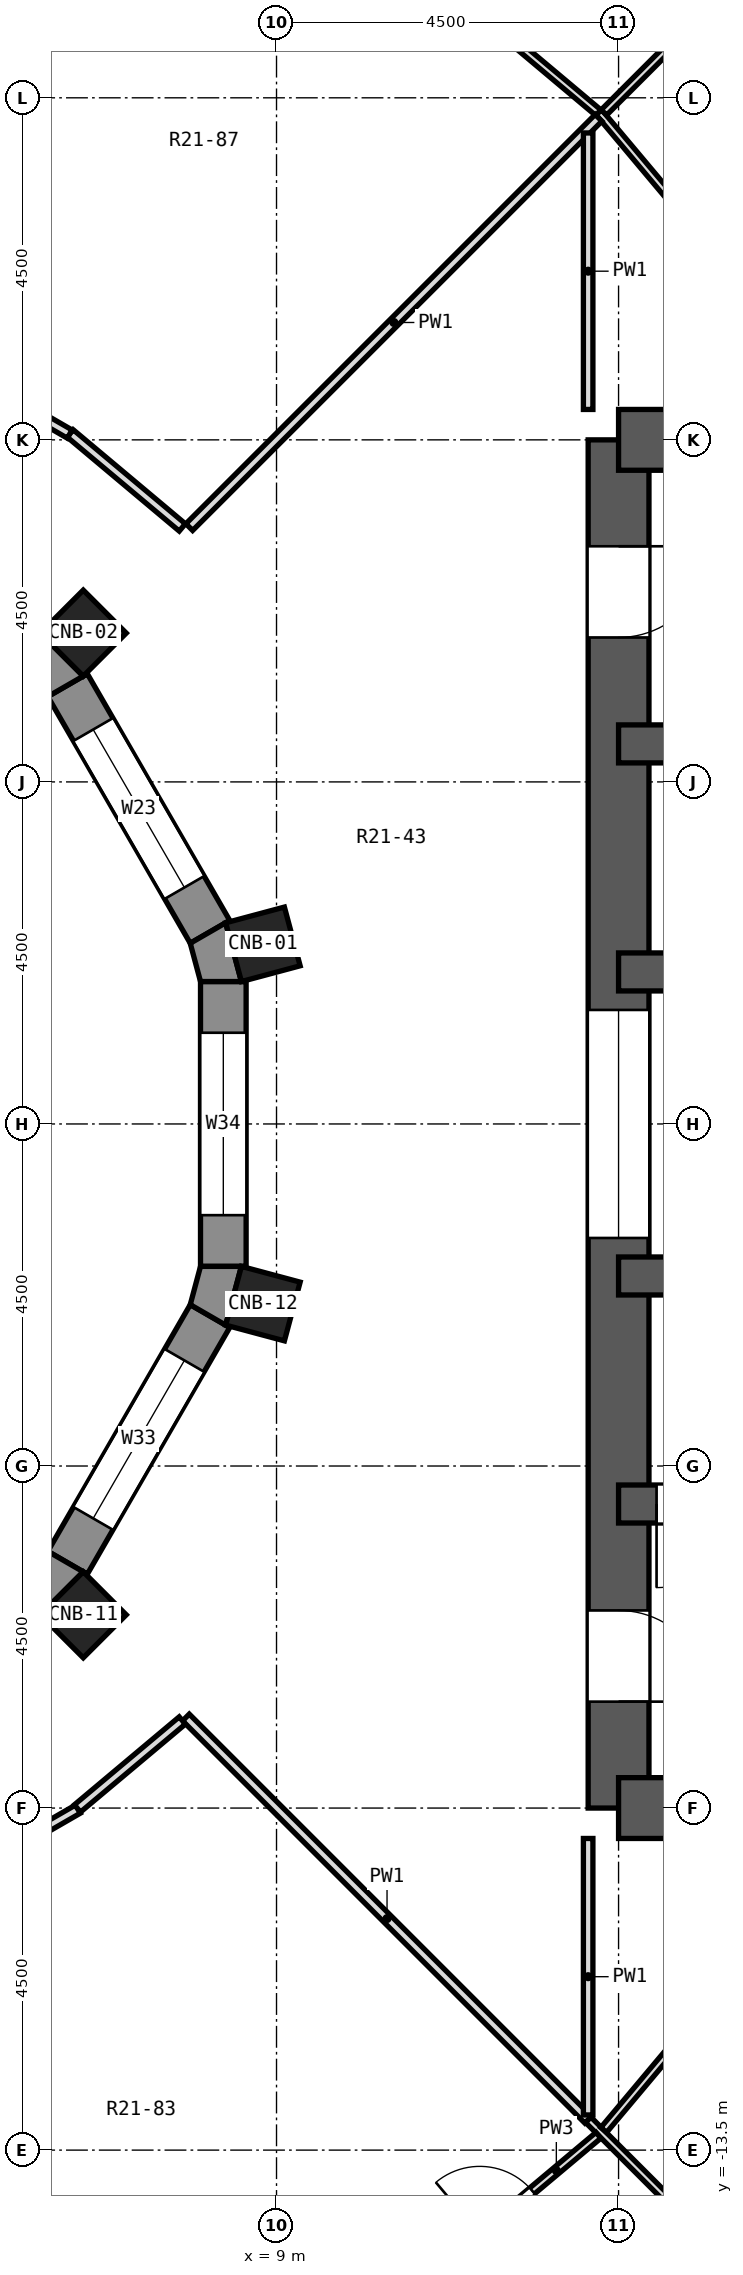
"""IFC4 building model, lengths in metres.
Left out: names, types, materials, properties, quantities, classifications, styles, units other than length and angle.
Written with IfcOpenShell. Run it as: python <this file> out.ifc"""

import sys

from ifc_helpers import new_model, si_unit, direction, frame, frame_2d, origin, origin_2d, place, context, subcontext, project, spatial, polyline, rectangle, outline, extrude, element, fill, save


model = new_model("IFC4")
c1 = context("Model", 3, precision=1e-05, world=origin(), true_north=direction((0.0, 1.0)))
c2 = subcontext(c1, "Body", "Model", "MODEL_VIEW")
j1 = project(units=[si_unit("LENGTHUNIT", "METRE"), si_unit("PLANEANGLEUNIT", "RADIAN")], contexts=[c1])
p1 = place(None, origin())
s1 = spatial("IfcSite", under=j1, at=p1, CompositionType="ELEMENT")
p2 = place(p1, origin())
s2 = spatial("IfcBuilding", under=s1, at=p2, CompositionType="ELEMENT")
p3 = place(p2, frame((0.0, 0.0, 131.5)))
s3 = spatial("IfcBuildingStorey", under=s2, at=p3, CompositionType="ELEMENT", Elevation=131.5)
for number, where, z_axis, x_axis in (
    (1, (8.821, 2.364, 0.0), (0.0, 0.0, 1.0), (0.966, 0.259, 0.0)),
    (2, (6.458, 6.458, 0.0), (0.0, 0.0, 1.0), (0.707, 0.707, 0.0)),
    (3, (6.458, -6.458, 0.0), (0.0, 0.0, 1.0), (0.707, -0.707, 0.0)),
    (4, (8.821, -2.364, 0.0), (0.0, 0.0, 1.0), (0.966, -0.259, 0.0)),
):
    element("IfcColumn", number, at=place(p3, frame(where, z_axis=z_axis, x_axis=x_axis)), inside=s3, PredefinedType="COLUMN", context=c2, shape_type="SweptSolid", body=[
        extrude(rectangle(XDim=0.8, YDim=0.8, at=origin_2d()), origin(), (0.0, 0.0, 1.0), 3.3),
    ])
p4 = place(p3, frame((13.5, -9.0, 0.0), z_axis=(0.0, 0.0, 1.0), x_axis=(0.0, 1.0, 0.0)))
e5 = element("IfcWall", 5, at=p4, inside=s3, PredefinedType="SHEAR", context=c2, shape_type="SweptSolid", body=[
    extrude(rectangle(XDim=18.0, YDim=0.8, at=frame_2d((9.0, 0.0))), origin(), (0.0, 0.0, 1.0), 3.3),
])
p5 = place(p4, frame((15.4, 0.0, 0.0)))
e6 = element("IfcOpeningElement", 6, at=p5, cuts=e5, PredefinedType="OPENING", context=c2, shape_type="SweptSolid", body=[
    extrude(rectangle(XDim=1.2, YDim=2.1, at=frame_2d((0.6, 1.05))), frame((0.0, 0.412, 0.0), z_axis=(0.0, -1.0, 0.0), x_axis=(1.0, 0.0, 0.0)), (0.0, 0.0, 1.0), 0.824),
])
p6 = place(p4, frame((1.4, 0.0, 0.0)))
e7 = element("IfcOpeningElement", 7, at=p6, cuts=e5, PredefinedType="OPENING", context=c2, shape_type="SweptSolid", body=[
    extrude(rectangle(XDim=1.2, YDim=2.1, at=frame_2d((0.6, 1.05))), frame((0.0, 0.412, 0.0), z_axis=(0.0, -1.0, 0.0), x_axis=(1.0, 0.0, 0.0)), (0.0, 0.0, 1.0), 0.824),
])
p7 = place(p4, frame((7.5, 0.0, 0.0)))
e8 = element("IfcOpeningElement", 8, at=p7, cuts=e5, PredefinedType="OPENING", context=c2, shape_type="SweptSolid", body=[
    extrude(rectangle(XDim=3.0, YDim=2.4, at=frame_2d((1.5, 1.2))), frame((0.0, 0.412, 0.0), z_axis=(0.0, -1.0, 0.0), x_axis=(1.0, 0.0, 0.0)), (0.0, 0.0, 1.0), 0.824),
])
for number, where, z_axis, x_axis in (
    (9, (13.5, 9.0, 0.0), (0.0, 0.0, 1.0), (1.0, 0.0, 0.0)),
    (10, (13.5, -9.0, 0.0), (0.0, 0.0, 1.0), (1.0, 0.0, 0.0)),
):
    element("IfcWall", number, at=place(p3, frame(where, z_axis=z_axis, x_axis=x_axis)), inside=s3, PredefinedType="SHEAR", context=c2, shape_type="SweptSolid", body=[
        extrude(rectangle(XDim=10.4, YDim=0.8, at=frame_2d((5.2, 0.0))), origin(), (0.0, 0.0, 1.0), 3.3),
    ])
p8 = place(p3, frame((13.5, 5.0, 0.0), z_axis=(0.0, 0.0, 1.0), x_axis=(1.0, 0.0, 0.0)))
e11 = element("IfcWall", 11, at=p8, inside=s3, PredefinedType="SHEAR", context=c2, shape_type="SweptSolid", body=[
    extrude(rectangle(XDim=10.4, YDim=0.5, at=frame_2d((5.2, 0.0))), origin(), (0.0, 0.0, 1.0), 3.3),
])
p9 = place(p8, frame((8.686, 0.0, 0.0)))
e12 = element("IfcOpeningElement", 12, at=p9, cuts=e11, PredefinedType="OPENING", context=c2, shape_type="SweptSolid", body=[
    extrude(rectangle(XDim=0.9, YDim=2.1, at=frame_2d((0.45, 1.05))), frame((0.0, 0.262, 0.0), z_axis=(0.0, -1.0, 0.0), x_axis=(1.0, 0.0, 0.0)), (0.0, 0.0, 1.0), 0.524),
])
p10 = place(p3, frame((13.5, -5.0, 0.0), z_axis=(0.0, 0.0, 1.0), x_axis=(1.0, 0.0, 0.0)))
e13 = element("IfcWall", 13, at=p10, inside=s3, PredefinedType="SHEAR", context=c2, shape_type="SweptSolid", body=[
    extrude(rectangle(XDim=10.4, YDim=0.5, at=frame_2d((5.2, 0.0))), origin(), (0.0, 0.0, 1.0), 3.3),
])
p11 = place(p10, frame((6.639, 0.0, 0.0)))
e14 = element("IfcOpeningElement", 14, at=p11, cuts=e13, PredefinedType="OPENING", context=c2, shape_type="SweptSolid", body=[
    extrude(rectangle(XDim=0.9, YDim=2.1, at=frame_2d((0.45, 1.05))), frame((0.0, 0.262, 0.0), z_axis=(0.0, -1.0, 0.0), x_axis=(1.0, 0.0, 0.0)), (0.0, 0.0, 1.0), 0.524),
])
p12 = place(p10, frame((8.756, 0.0, 0.0)))
e15 = element("IfcOpeningElement", 15, at=p12, cuts=e13, PredefinedType="OPENING", context=c2, shape_type="SweptSolid", body=[
    extrude(rectangle(XDim=0.9, YDim=2.1, at=frame_2d((0.45, 1.05))), frame((0.0, 0.262, 0.0), z_axis=(0.0, -1.0, 0.0), x_axis=(1.0, 0.0, 0.0)), (0.0, 0.0, 1.0), 0.524),
])
p13 = place(p10, frame((0.5, 0.0, 0.0)))
e16 = element("IfcOpeningElement", 16, at=p13, cuts=e13, PredefinedType="OPENING", context=c2, shape_type="SweptSolid", body=[
    extrude(rectangle(XDim=1.1, YDim=2.1, at=frame_2d((0.55, 1.05))), frame((0.0, 0.262, 0.0), z_axis=(0.0, -1.0, 0.0), x_axis=(1.0, 0.0, 0.0)), (0.0, 0.0, 1.0), 0.524),
])
p14 = place(p3, frame((13.5, 2.0, 0.0), z_axis=(0.0, 0.0, 1.0), x_axis=(1.0, 0.0, 0.0)))
e17 = element("IfcWall", 17, at=p14, inside=s3, PredefinedType="SHEAR", context=c2, shape_type="SweptSolid", body=[
    extrude(rectangle(XDim=10.4, YDim=0.5, at=frame_2d((5.2, 0.0))), origin(), (0.0, 0.0, 1.0), 3.3),
])
p15 = place(p14, frame((5.37, 0.0, 0.0)))
e18 = element("IfcOpeningElement", 18, at=p15, cuts=e17, PredefinedType="OPENING", context=c2, shape_type="SweptSolid", body=[
    extrude(rectangle(XDim=1.1, YDim=2.1, at=frame_2d((0.55, 1.05))), frame((0.0, 0.262, 0.0), z_axis=(0.0, -1.0, 0.0), x_axis=(1.0, 0.0, 0.0)), (0.0, 0.0, 1.0), 0.524),
])
p16 = place(p14, frame((1.511, 0.0, 0.0)))
e19 = element("IfcOpeningElement", 19, at=p16, cuts=e17, PredefinedType="OPENING", context=c2, shape_type="SweptSolid", body=[
    extrude(rectangle(XDim=0.9, YDim=2.1, at=frame_2d((0.45, 1.05))), frame((0.0, 0.262, 0.0), z_axis=(0.0, -1.0, 0.0), x_axis=(1.0, 0.0, 0.0)), (0.0, 0.0, 1.0), 0.524),
])
p17 = place(p14, frame((3.841, 0.0, 0.0)))
e20 = element("IfcOpeningElement", 20, at=p17, cuts=e17, PredefinedType="OPENING", context=c2, shape_type="SweptSolid", body=[
    extrude(rectangle(XDim=0.9, YDim=2.1, at=frame_2d((0.45, 1.05))), frame((0.0, 0.262, 0.0), z_axis=(0.0, -1.0, 0.0), x_axis=(1.0, 0.0, 0.0)), (0.0, 0.0, 1.0), 0.524),
])
p18 = place(p14, frame((7.355, 0.0, 0.0)))
e21 = element("IfcOpeningElement", 21, at=p18, cuts=e17, PredefinedType="OPENING", context=c2, shape_type="SweptSolid", body=[
    extrude(rectangle(XDim=0.9, YDim=2.1, at=frame_2d((0.45, 1.05))), frame((0.0, 0.262, 0.0), z_axis=(0.0, -1.0, 0.0), x_axis=(1.0, 0.0, 0.0)), (0.0, 0.0, 1.0), 0.524),
])
p19 = place(p14, frame((8.686, 0.0, 0.0)))
e22 = element("IfcOpeningElement", 22, at=p19, cuts=e17, PredefinedType="OPENING", context=c2, shape_type="SweptSolid", body=[
    extrude(rectangle(XDim=0.9, YDim=2.1, at=frame_2d((0.45, 1.05))), frame((0.0, 0.262, 0.0), z_axis=(0.0, -1.0, 0.0), x_axis=(1.0, 0.0, 0.0)), (0.0, 0.0, 1.0), 0.524),
])
p20 = place(p3, frame((13.5, -2.0, 0.0), z_axis=(0.0, 0.0, 1.0), x_axis=(1.0, 0.0, 0.0)))
e23 = element("IfcWall", 23, at=p20, inside=s3, PredefinedType="SHEAR", context=c2, shape_type="SweptSolid", body=[
    extrude(rectangle(XDim=10.4, YDim=0.5, at=frame_2d((5.2, 0.0))), origin(), (0.0, 0.0, 1.0), 3.3),
])
p21 = place(p20, frame((1.215, 0.0, 0.0)))
e24 = element("IfcOpeningElement", 24, at=p21, cuts=e23, PredefinedType="OPENING", context=c2, shape_type="SweptSolid", body=[
    extrude(rectangle(XDim=1.0, YDim=2.1, at=frame_2d((0.5, 1.05))), frame((0.0, 0.262, 0.0), z_axis=(0.0, -1.0, 0.0), x_axis=(1.0, 0.0, 0.0)), (0.0, 0.0, 1.0), 0.524),
])
p22 = place(p20, frame((6.384, 0.0, 0.0)))
e25 = element("IfcOpeningElement", 25, at=p22, cuts=e23, PredefinedType="OPENING", context=c2, shape_type="SweptSolid", body=[
    extrude(rectangle(XDim=0.9, YDim=2.1, at=frame_2d((0.45, 1.05))), frame((0.0, 0.262, 0.0), z_axis=(0.0, -1.0, 0.0), x_axis=(1.0, 0.0, 0.0)), (0.0, 0.0, 1.0), 0.524),
])
p23 = place(p20, frame((8.729, 0.0, 0.0)))
e26 = element("IfcOpeningElement", 26, at=p23, cuts=e23, PredefinedType="OPENING", context=c2, shape_type="SweptSolid", body=[
    extrude(rectangle(XDim=0.9, YDim=2.1, at=frame_2d((0.45, 1.05))), frame((0.0, 0.262, 0.0), z_axis=(0.0, -1.0, 0.0), x_axis=(1.0, 0.0, 0.0)), (0.0, 0.0, 1.0), 0.524),
])
p24 = place(p3, frame((8.125, 2.527, 0.0), z_axis=(0.0, 0.0, 1.0), x_axis=(-0.499964958637, 0.86604563398, 0.0)))
e27 = element("IfcWall", 27, at=p24, inside=s3, PredefinedType="SOLIDWALL", context=c2, shape_type="SweptSolid", body=[
    extrude(rectangle(XDim=3.747, YDim=0.6, at=frame_2d((1.874, 0.0))), origin(), (0.0, 0.0, 1.0), 2.8),
])
p25 = place(p24, frame((0.674, 0.0, 0.9)))
e28 = element("IfcOpeningElement", 28, at=p25, cuts=e27, PredefinedType="OPENING", context=c2, shape_type="SweptSolid", body=[
    extrude(rectangle(XDim=2.4, YDim=1.8, at=frame_2d((1.2, 0.9))), frame((0.0, 0.312, 0.0), z_axis=(0.0, -1.0, 0.0), x_axis=(1.0, 0.0, 0.0)), (0.0, 0.0, 1.0), 0.624),
])
p26 = place(p3, frame((6.251, -5.773, 0.0), z_axis=(0.0, 0.0, 1.0), x_axis=(0.499964958637, 0.86604563398, 0.0)))
e29 = element("IfcWall", 29, at=p26, inside=s3, PredefinedType="SOLIDWALL", context=c2, shape_type="SweptSolid", body=[
    extrude(rectangle(XDim=3.747, YDim=0.6, at=frame_2d((1.874, 0.0))), origin(), (0.0, 0.0, 1.0), 2.8),
])
p27 = place(p26, frame((0.674, 0.0, 0.9)))
e30 = element("IfcOpeningElement", 30, at=p27, cuts=e29, PredefinedType="OPENING", context=c2, shape_type="SweptSolid", body=[
    extrude(rectangle(XDim=2.4, YDim=1.8, at=frame_2d((1.2, 0.9))), frame((0.0, 0.312, 0.0), z_axis=(0.0, -1.0, 0.0), x_axis=(1.0, 0.0, 0.0)), (0.0, 0.0, 1.0), 0.624),
])
p28 = place(p3, frame((8.3, -1.874, 0.0), z_axis=(0.0, 0.0, 1.0), x_axis=(0.0, 1.0, 0.0)))
e31 = element("IfcWall", 31, at=p28, inside=s3, PredefinedType="SOLIDWALL", context=c2, shape_type="SweptSolid", body=[
    extrude(rectangle(XDim=3.748, YDim=0.6, at=frame_2d((1.874, 0.0))), origin(), (0.0, 0.0, 1.0), 2.8),
])
p29 = place(p28, frame((0.674, 0.0, 0.9)))
e32 = element("IfcOpeningElement", 32, at=p29, cuts=e31, PredefinedType="OPENING", context=c2, shape_type="SweptSolid", body=[
    extrude(rectangle(XDim=2.4, YDim=1.8, at=frame_2d((1.2, 0.9))), frame((0.0, 0.312, 0.0), z_axis=(0.0, -1.0, 0.0), x_axis=(1.0, 0.0, 0.0)), (0.0, 0.0, 1.0), 0.624),
])
p30 = place(p3, origin())
e33 = element("IfcWall", 33, at=p30, inside=s3, PredefinedType="SOLIDWALL", context=c2, shape_type="SweptSolid", body=[
    extrude(outline(polyline([(8.331, 2.646), (7.865, 2.377), (8.0, 1.874), (8.538, 1.874), (8.331, 2.646)])), origin(), (0.0, 0.0, 1.0), 2.8),
])
p31 = place(p3, origin())
e34 = element("IfcWall", 34, at=p31, inside=s3, PredefinedType="SOLIDWALL", context=c2, shape_type="SweptSolid", body=[
    extrude(outline(polyline([(5.892, 6.458), (5.623, 5.991), (5.991, 5.623), (6.458, 5.892), (5.892, 6.458)])), origin(), (0.0, 0.0, 1.0), 2.8),
])
p32 = place(p3, origin())
e35 = element("IfcWall", 35, at=p32, inside=s3, PredefinedType="SOLIDWALL", context=c2, shape_type="SweptSolid", body=[
    extrude(outline(polyline([(5.892, -6.458), (6.458, -5.892), (5.991, -5.623), (5.623, -5.991), (5.892, -6.458)])), origin(), (0.0, 0.0, 1.0), 2.8),
])
p33 = place(p3, origin())
e36 = element("IfcWall", 36, at=p33, inside=s3, PredefinedType="SOLIDWALL", context=c2, shape_type="SweptSolid", body=[
    extrude(outline(polyline([(8.538, -1.874), (8.0, -1.874), (7.865, -2.377), (8.331, -2.646), (8.538, -1.874)])), origin(), (0.0, 0.0, 1.0), 2.8),
])
p34 = place(p3, frame((13.239, 13.311, 0.0), z_axis=(0.0, 0.0, 1.0), x_axis=(0.643004881109, -0.76586207823, 0.0)))
e37 = element("IfcWall", 37, at=p34, inside=s3, PredefinedType="PARTITIONING", context=c2, shape_type="SweptSolid", body=[
    extrude(rectangle(XDim=3.273, YDim=0.1, at=frame_2d((1.636, 0.0))), origin(), (0.0, 0.0, 1.0), 2.8),
])
p35 = place(p3, frame((13.1, -13.1, 0.0), z_axis=(0.0, 0.0, 1.0), x_axis=(0.707106781187, -0.707106781187, 0.0)))
e38 = element("IfcWall", 38, at=p35, inside=s3, PredefinedType="PARTITIONING", context=c2, shape_type="SweptSolid", body=[
    extrude(rectangle(XDim=7.139, YDim=0.1, at=frame_2d((3.569, 0.0))), origin(), (0.0, 0.0, 1.0), 2.8),
])
p36 = place(p35, frame((3.609, 0.0, 0.0)))
e39 = element("IfcOpeningElement", 39, at=p36, cuts=e38, PredefinedType="OPENING", context=c2, shape_type="SweptSolid", body=[
    extrude(rectangle(XDim=0.9, YDim=2.1, at=frame_2d((0.45, 1.05))), frame((0.0, 0.062, 0.0), z_axis=(0.0, -1.0, 0.0), x_axis=(1.0, 0.0, 0.0)), (0.0, 0.0, 1.0), 0.124),
])
p37 = place(p3, frame((7.808, -7.808, 0.0), z_axis=(0.0, 0.0, 1.0), x_axis=(0.707106781187, -0.707106781187, 0.0)))
e40 = element("IfcWall", 40, at=p37, inside=s3, PredefinedType="PARTITIONING", context=c2, shape_type="SweptSolid", body=[
    extrude(rectangle(XDim=7.484, YDim=0.125, at=frame_2d((3.742, 0.0))), origin(), (0.0, 0.0, 1.0), 2.8),
])
p38 = place(p3, frame((6.284, 9.086, 0.0), z_axis=(0.0, 0.0, 1.0), x_axis=(0.766243876147, -0.642549859752, 0.0)))
e41 = element("IfcWall", 41, at=p38, inside=s3, PredefinedType="PARTITIONING", context=c2, shape_type="SweptSolid", body=[
    extrude(rectangle(XDim=1.926, YDim=0.125, at=frame_2d((0.963, 0.0))), origin(), (0.0, 0.0, 1.0), 2.8),
])
p39 = place(p3, frame((10.727, 15.409, 0.0), z_axis=(0.0, 0.0, 1.0), x_axis=(0.76586207823, -0.643004881109, 0.0)))
e42 = element("IfcWall", 42, at=p39, inside=s3, PredefinedType="PARTITIONING", context=c2, shape_type="SweptSolid", body=[
    extrude(rectangle(XDim=3.273, YDim=0.1, at=frame_2d((1.636, 0.0))), origin(), (0.0, 0.0, 1.0), 2.8),
])
p40 = place(p3, frame((4.612, 10.039, 0.0), z_axis=(0.0, 0.0, 1.0), x_axis=(0.865978590021, -0.500081075052, 0.0)))
e43 = element("IfcWall", 43, at=p40, inside=s3, PredefinedType="PARTITIONING", context=c2, shape_type="SweptSolid", body=[
    extrude(rectangle(XDim=1.925, YDim=0.125, at=frame_2d((0.962, 0.0))), origin(), (0.0, 0.0, 1.0), 2.8),
])
p41 = place(p3, frame((4.721, -9.976, 0.0), z_axis=(0.0, 0.0, 1.0), x_axis=(0.865946867621, 0.500136003959, 0.0)))
e44 = element("IfcWall", 44, at=p41, inside=s3, PredefinedType="PARTITIONING", context=c2, shape_type="SweptSolid", body=[
    extrude(rectangle(XDim=1.925, YDim=0.125, at=frame_2d((0.962, 0.0))), origin(), (0.0, 0.0, 1.0), 2.8),
])
p42 = place(p3, frame((10.804, -15.344, 0.0), z_axis=(0.0, 0.0, 1.0), x_axis=(0.766167094934, 0.642641410618, 0.0)))
e45 = element("IfcWall", 45, at=p42, inside=s3, PredefinedType="PARTITIONING", context=c2, shape_type="SweptSolid", body=[
    extrude(rectangle(XDim=3.172, YDim=0.1, at=frame_2d((1.586, 0.0))), origin(), (0.0, 0.0, 1.0), 2.8),
])
p43 = place(p42, frame((1.136, 0.0, 0.0)))
e46 = element("IfcOpeningElement", 46, at=p43, cuts=e45, PredefinedType="OPENING", context=c2, shape_type="SweptSolid", body=[
    extrude(rectangle(XDim=0.9, YDim=2.1, at=frame_2d((0.45, 1.05))), frame((0.0, 0.062, 0.0), z_axis=(0.0, -1.0, 0.0), x_axis=(1.0, 0.0, 0.0)), (0.0, 0.0, 1.0), 0.124),
])
p44 = place(p3, frame((6.381, -9.005, 0.0), z_axis=(0.0, 0.0, 1.0), x_axis=(0.766182926266, 0.642622535785, 0.0)))
e47 = element("IfcWall", 47, at=p44, inside=s3, PredefinedType="PARTITIONING", context=c2, shape_type="SweptSolid", body=[
    extrude(rectangle(XDim=1.8, YDim=0.125, at=frame_2d((0.9, 0.0))), origin(), (0.0, 0.0, 1.0), 2.8),
])
p45 = place(p3, frame((13.307, 13.307, 0.0), z_axis=(0.0, 0.0, 1.0), x_axis=(0.707106781187, 0.707106781187, 0.0)))
e48 = element("IfcWall", 48, at=p45, inside=s3, PredefinedType="PARTITIONING", context=c2, shape_type="SweptSolid", body=[
    extrude(rectangle(XDim=6.846, YDim=0.1, at=frame_2d((3.423, 0.0))), origin(), (0.0, 0.0, 1.0), 2.8),
])
p46 = place(p45, frame((3.315, 0.0, 0.0)))
e49 = element("IfcOpeningElement", 49, at=p46, cuts=e48, PredefinedType="OPENING", context=c2, shape_type="SweptSolid", body=[
    extrude(rectangle(XDim=0.9, YDim=2.1, at=frame_2d((0.45, 1.05))), frame((0.0, 0.062, 0.0), z_axis=(0.0, -1.0, 0.0), x_axis=(1.0, 0.0, 0.0)), (0.0, 0.0, 1.0), 0.124),
])
p47 = place(p3, frame((7.852, 7.852, 0.0), z_axis=(0.0, 0.0, 1.0), x_axis=(0.707106781187, 0.707106781187, 0.0)))
e50 = element("IfcWall", 50, at=p47, inside=s3, PredefinedType="PARTITIONING", context=c2, shape_type="SweptSolid", body=[
    extrude(rectangle(XDim=7.615, YDim=0.125, at=frame_2d((3.807, 0.0))), origin(), (0.0, 0.0, 1.0), 2.8),
])
p48 = place(p3, frame((13.305, -13.235, 0.0), z_axis=(0.0, 0.0, 1.0), x_axis=(0.642682886784, 0.766132303871, 0.0)))
e51 = element("IfcWall", 51, at=p48, inside=s3, PredefinedType="PARTITIONING", context=c2, shape_type="SweptSolid", body=[
    extrude(rectangle(XDim=3.273, YDim=0.1, at=frame_2d((1.636, 0.0))), origin(), (0.0, 0.0, 1.0), 2.8),
])
for number, where, z_axis, x_axis in (
    (52, (13.1, -13.038, 0.0), (0.0, 0.0, 1.0), (0.0, 1.0, 0.0)),
    (53, (13.1, 9.4, 0.0), (0.0, 0.0, 1.0), (0.0, 1.0, 0.0)),
):
    element("IfcWall", number, at=place(p3, frame(where, z_axis=z_axis, x_axis=x_axis)), inside=s3, PredefinedType="PARTITIONING", context=c2, shape_type="SweptSolid", body=[
        extrude(rectangle(XDim=3.638, YDim=0.125, at=frame_2d((1.819, 0.0))), origin(), (0.0, 0.0, 1.0), 2.8),
    ])
p49 = place(p25, origin())
e54 = element("IfcWindow", 54, at=p49, inside=s3, PartitioningType="SINGLE_PANEL", PredefinedType="WINDOW", context=c2, shape_type="SweptSolid", body=[
    extrude(rectangle(XDim=2.4, YDim=1.8, at=frame_2d((1.2, 0.9))), frame((0.0, -0.12, 0.0), z_axis=(0.0, -1.0, 0.0), x_axis=(1.0, 0.0, 0.0)), (0.0, 0.0, 1.0), 0.06),
])
fill(e28, e54)
p50 = place(p27, origin())
e55 = element("IfcWindow", 55, at=p50, inside=s3, PartitioningType="SINGLE_PANEL", PredefinedType="WINDOW", context=c2, shape_type="SweptSolid", body=[
    extrude(rectangle(XDim=2.4, YDim=1.8, at=frame_2d((1.2, 0.9))), frame((0.0, -0.12, 0.0), z_axis=(0.0, -1.0, 0.0), x_axis=(1.0, 0.0, 0.0)), (0.0, 0.0, 1.0), 0.06),
])
fill(e30, e55)
p51 = place(p29, origin())
e56 = element("IfcWindow", 56, at=p51, inside=s3, PartitioningType="SINGLE_PANEL", PredefinedType="WINDOW", context=c2, shape_type="SweptSolid", body=[
    extrude(rectangle(XDim=2.4, YDim=1.8, at=frame_2d((1.2, 0.9))), frame((0.0, -0.12, 0.0), z_axis=(0.0, -1.0, 0.0), x_axis=(1.0, 0.0, 0.0)), (0.0, 0.0, 1.0), 0.06),
])
fill(e32, e56)
p52 = place(p43, origin())
e57 = element("IfcDoor", 57, at=p52, inside=s3, OperationType="SINGLE_SWING_LEFT", PredefinedType="DOOR", context=c2, shape_type="SweptSolid", body=[
    extrude(rectangle(XDim=0.9, YDim=2.1, at=frame_2d((0.45, 1.05))), frame((0.0, 0.025, 0.0), z_axis=(0.0, -1.0, 0.0), x_axis=(1.0, 0.0, 0.0)), (0.0, 0.0, 1.0), 0.05),
])
fill(e46, e57)
p53 = place(p13, frame((1.1, 0.0, 0.0), z_axis=(0.0, 0.0, 1.0), x_axis=(-1.0, 0.0, 0.0)))
e58 = element("IfcDoor", 58, at=p53, inside=s3, OperationType="SINGLE_SWING_RIGHT", PredefinedType="DOOR", context=c2, shape_type="SweptSolid", body=[
    extrude(rectangle(XDim=1.1, YDim=2.1, at=frame_2d((0.55, 1.05))), frame((0.0, 0.025, 0.0), z_axis=(0.0, -1.0, 0.0), x_axis=(1.0, 0.0, 0.0)), (0.0, 0.0, 1.0), 0.05),
])
fill(e16, e58)
p54 = place(p5, frame((1.2, 0.0, 0.0), z_axis=(0.0, 0.0, 1.0), x_axis=(-1.0, 0.0, 0.0)))
e59 = element("IfcDoor", 59, at=p54, inside=s3, OperationType="SINGLE_SWING_LEFT", PredefinedType="DOOR", context=c2, shape_type="SweptSolid", body=[
    extrude(rectangle(XDim=1.2, YDim=2.1, at=frame_2d((0.6, 1.05))), frame((0.0, 0.025, 0.0), z_axis=(0.0, -1.0, 0.0), x_axis=(1.0, 0.0, 0.0)), (0.0, 0.0, 1.0), 0.05),
])
fill(e6, e59)
p55 = place(p6, frame((1.2, 0.0, 0.0), z_axis=(0.0, 0.0, 1.0), x_axis=(-1.0, 0.0, 0.0)))
e60 = element("IfcDoor", 60, at=p55, inside=s3, OperationType="SINGLE_SWING_RIGHT", PredefinedType="DOOR", context=c2, shape_type="SweptSolid", body=[
    extrude(rectangle(XDim=1.2, YDim=2.1, at=frame_2d((0.6, 1.05))), frame((0.0, 0.025, 0.0), z_axis=(0.0, -1.0, 0.0), x_axis=(1.0, 0.0, 0.0)), (0.0, 0.0, 1.0), 0.05),
])
fill(e7, e60)
p56 = place(p7, origin())
e61 = element("IfcDoor", 61, at=p56, inside=s3, OperationType="DOUBLE_DOOR_SLIDING", PredefinedType="DOOR", context=c2, shape_type="SweptSolid", body=[
    extrude(rectangle(XDim=3.0, YDim=2.4, at=frame_2d((1.5, 1.2))), frame((0.0, 0.025, 0.0), z_axis=(0.0, -1.0, 0.0), x_axis=(1.0, 0.0, 0.0)), (0.0, 0.0, 1.0), 0.05),
])
fill(e8, e61)
save(model, sys.argv[1])
